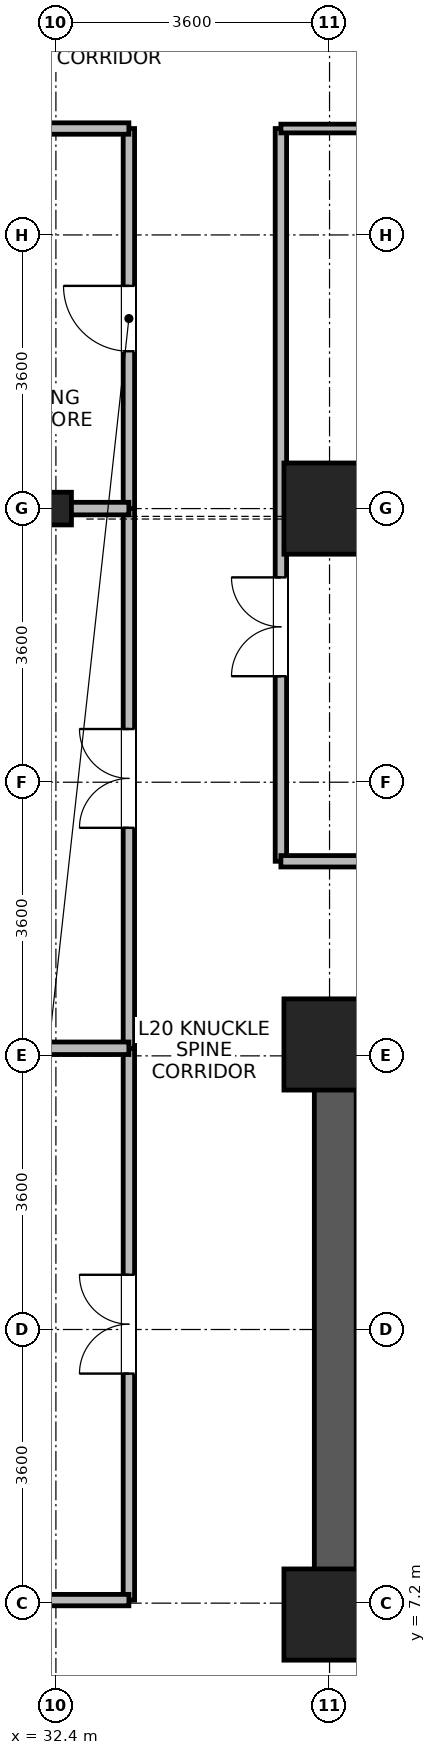
"""IFC4 building model, lengths in metres.
Left out: names, types, materials, properties, quantities, classifications, styles, units other than length and angle.
Written with IfcOpenShell. Run it as: python <this file> out.ifc"""

import sys

from ifc_helpers import new_model, si_unit, direction, frame, frame_2d, origin, origin_2d, place, context, subcontext, project, spatial, rectangle, i_section, extrude, source, transform, mapped, element, fill, save


model = new_model("IFC4")
c1 = context("Model", 3, precision=1e-05, world=origin(), true_north=direction((0.0, 1.0)))
c2 = subcontext(c1, "Body", "Model", "MODEL_VIEW")
j1 = project(units=[si_unit("LENGTHUNIT", "METRE"), si_unit("PLANEANGLEUNIT", "RADIAN")], contexts=[c1])
p1 = place(None, origin())
s1 = spatial("IfcSite", under=j1, at=p1, CompositionType="ELEMENT")
p2 = place(p1, origin())
s2 = spatial("IfcBuilding", under=s1, at=p2, CompositionType="ELEMENT")
p3 = place(p2, frame((0.0, 0.0, 82.3)))
s3 = spatial("IfcBuildingStorey", under=s2, at=p3, CompositionType="ELEMENT", Elevation=82.3)
p4 = place(p3, frame((36.075, 6.75, 0.0), z_axis=(0.0, 0.0, 1.0), x_axis=(0.0, 1.0, 0.0)))
e1 = element("IfcWall", 1, at=p4, inside=s3, PredefinedType="SHEAR", context=c2, shape_type="SweptSolid", body=[
    extrude(rectangle(XDim=8.1, YDim=0.55, at=frame_2d((4.05, 0.0))), origin(), (0.0, 0.0, 1.0), 3.45),
])
m1 = source(origin(), c2, "Body", "SweptSolid", [
    extrude(rectangle(XDim=1.2, YDim=1.2, at=origin_2d()), origin(), (0.0, 0.0, 1.0), 3.7),
])
for number, where, z_axis, x_axis in (
    (2, (36.0, 21.6, 0.0), (0.0, 0.0, 1.0), (1.0, 0.0, 0.0)),
    (3, (36.0, 7.05, 0.0), (0.0, 0.0, 1.0), (1.0, 0.0, 0.0)),
    (4, (36.0, 14.55, 0.0), (0.0, 0.0, 1.0), (1.0, 0.0, 0.0)),
):
    element("IfcColumn", number, at=place(p3, frame(where, z_axis=z_axis, x_axis=x_axis)), inside=s3, PredefinedType="COLUMN", context=c2, shape_type="MappedRepresentation", body=[
        mapped(m1, transform((0.0, 0.0, 0.0), x_axis=(1.0, 0.0, 0.0), y_axis=(0.0, 1.0, 0.0), z_axis=(0.0, 0.0, 1.0), scale=1.0)),
    ])
m2 = source(origin(), c2, "Body", "SweptSolid", [
    extrude(i_section(OverallWidth=0.409, OverallDepth=0.43, WebThickness=0.024, FlangeThickness=0.033, FilletRadius=0.015, at=origin_2d()), origin(), (0.0, 0.0, 1.0), 3.7),
])
p5 = place(p3, frame((32.4, 21.6, 0.0), z_axis=(0.0, 0.0, 1.0), x_axis=(1.0, 0.0, 0.0)))
e5 = element("IfcColumn", 5, at=p5, inside=s3, PredefinedType="COLUMN", context=c2, shape_type="MappedRepresentation", body=[
    mapped(m2, transform((0.0, 0.0, 0.0), x_axis=(1.0, 0.0, 0.0), y_axis=(0.0, 1.0, 0.0), z_axis=(0.0, 0.0, 1.0), scale=1.0)),
])
p6 = place(p3, frame((35.36, 16.96, 0.0), z_axis=(0.0, 0.0, 1.0), x_axis=(0.0, 1.0, 0.0)))
e6 = element("IfcWall", 6, at=p6, inside=s3, PredefinedType="PARTITIONING", context=c2, shape_type="SweptSolid", body=[
    extrude(rectangle(XDim=9.64, YDim=0.15, at=frame_2d((4.82, 0.0))), origin(), (0.0, 0.0, 1.0), 3.43),
])
p7 = place(p6, frame((2.435, 0.0, 0.0)))
e7 = element("IfcOpeningElement", 7, at=p7, cuts=e6, PredefinedType="OPENING", context=c2, shape_type="SweptSolid", body=[
    extrude(rectangle(XDim=1.3, YDim=2.12, at=frame_2d((0.65, 1.06))), frame((0.0, 0.085, 0.0), z_axis=(0.0, -1.0, 0.0), x_axis=(1.0, 0.0, 0.0)), (0.0, 0.0, 1.0), 0.17),
])
p8 = place(p3, frame((33.36, 7.24, 0.0), z_axis=(0.0, 0.0, 1.0), x_axis=(0.0, 1.0, 0.0)))
e8 = element("IfcWall", 8, at=p8, inside=s3, PredefinedType="PARTITIONING", context=c2, shape_type="SweptSolid", body=[
    extrude(rectangle(XDim=7.26, YDim=0.15, at=frame_2d((3.63, 0.0))), origin(), (0.0, 0.0, 1.0), 3.43),
])
p9 = place(p8, frame((2.98, 0.0, 0.0)))
e9 = element("IfcOpeningElement", 9, at=p9, cuts=e8, PredefinedType="OPENING", context=c2, shape_type="SweptSolid", body=[
    extrude(rectangle(XDim=1.3, YDim=2.12, at=frame_2d((0.65, 1.06))), frame((0.0, 0.085, 0.0), z_axis=(0.0, -1.0, 0.0), x_axis=(1.0, 0.0, 0.0)), (0.0, 0.0, 1.0), 0.17),
])
p10 = place(p3, frame((35.36, 16.96, 0.0), z_axis=(0.0, 0.0, 1.0), x_axis=(1.0, 0.0, 0.0)))
e10 = element("IfcWall", 10, at=p10, inside=s3, PredefinedType="PARTITIONING", context=c2, shape_type="SweptSolid", body=[
    extrude(rectangle(XDim=7.24, YDim=0.15, at=frame_2d((3.62, 0.0))), origin(), (0.0, 0.0, 1.0), 3.43),
])
p11 = place(p3, frame((33.36, 14.5, 0.0), z_axis=(0.0, 0.0, 1.0), x_axis=(0.0, 1.0, 0.0)))
e11 = element("IfcWall", 11, at=p11, inside=s3, PredefinedType="PARTITIONING", context=c2, shape_type="SweptSolid", body=[
    extrude(rectangle(XDim=7.1, YDim=0.15, at=frame_2d((3.55, 0.0))), origin(), (0.0, 0.0, 1.0), 3.43),
])
p12 = place(p11, frame((2.9, 0.0, 0.0)))
e12 = element("IfcOpeningElement", 12, at=p12, cuts=e11, PredefinedType="OPENING", context=c2, shape_type="SweptSolid", body=[
    extrude(rectangle(XDim=1.3, YDim=2.12, at=frame_2d((0.65, 1.06))), frame((0.0, 0.085, 0.0), z_axis=(0.0, -1.0, 0.0), x_axis=(1.0, 0.0, 0.0)), (0.0, 0.0, 1.0), 0.17),
])
p13 = place(p3, frame((33.36, 21.6, 0.0), z_axis=(0.0, 0.0, 1.0), x_axis=(0.0, 1.0, 0.0)))
e13 = element("IfcWall", 13, at=p13, inside=s3, PredefinedType="PARTITIONING", context=c2, shape_type="SweptSolid", body=[
    extrude(rectangle(XDim=5.0, YDim=0.15, at=frame_2d((2.5, 0.0))), origin(), (0.0, 0.0, 1.0), 3.43),
])
p14 = place(p13, frame((2.07, 0.0, 0.0)))
e14 = element("IfcOpeningElement", 14, at=p14, cuts=e13, PredefinedType="OPENING", context=c2, shape_type="SweptSolid", body=[
    extrude(rectangle(XDim=0.86, YDim=2.02, at=frame_2d((0.43, 1.01))), frame((0.0, 0.085, 0.0), z_axis=(0.0, -1.0, 0.0), x_axis=(1.0, 0.0, 0.0)), (0.0, 0.0, 1.0), 0.17),
])
p15 = place(p3, frame((30.46, 26.6, 0.0), z_axis=(0.0, 0.0, 1.0), x_axis=(1.0, 0.0, 0.0)))
e15 = element("IfcWall", 15, at=p15, inside=s3, PredefinedType="PARTITIONING", context=c2, shape_type="SweptSolid", body=[
    extrude(rectangle(XDim=2.9, YDim=0.15, at=frame_2d((1.45, 0.0))), origin(), (0.0, 0.0, 1.0), 3.43),
])
p16 = place(p3, frame((32.032, 7.24, 0.0), z_axis=(0.0, 0.0, 1.0), x_axis=(1.0, 0.0, 0.0)))
e16 = element("IfcWall", 16, at=p16, inside=s3, PredefinedType="PARTITIONING", context=c2, shape_type="SweptSolid", body=[
    extrude(rectangle(XDim=1.328, YDim=0.15, at=frame_2d((0.664, 0.0))), origin(), (0.0, 0.0, 1.0), 3.43),
])
p17 = place(p3, frame((35.36, 26.6, 0.0), z_axis=(0.0, 0.0, 1.0), x_axis=(1.0, 0.0, 0.0)))
e17 = element("IfcWall", 17, at=p17, inside=s3, PredefinedType="PARTITIONING", context=c2, shape_type="SweptSolid", body=[
    extrude(rectangle(XDim=7.24, YDim=0.115, at=frame_2d((3.62, 0.0))), origin(), (0.0, 0.0, 1.0), 3.43),
])
p18 = place(p3, frame((32.032, 14.5, 0.0), z_axis=(0.0, 0.0, 1.0), x_axis=(1.0, 0.0, 0.0)))
e18 = element("IfcWall", 18, at=p18, inside=s3, PredefinedType="PARTITIONING", context=c2, shape_type="SweptSolid", body=[
    extrude(rectangle(XDim=1.328, YDim=0.165, at=frame_2d((0.664, 0.0))), origin(), (0.0, 0.0, 1.0), 3.43),
])
p19 = place(p3, frame((32.032, 21.6, 0.0), z_axis=(0.0, 0.0, 1.0), x_axis=(1.0, 0.0, 0.0)))
e19 = element("IfcWall", 19, at=p19, inside=s3, PredefinedType="PARTITIONING", context=c2, shape_type="SweptSolid", body=[
    extrude(rectangle(XDim=1.328, YDim=0.165, at=frame_2d((0.664, 0.0))), origin(), (0.0, 0.0, 1.0), 2.93),
])
p20 = place(p7, origin())
e20 = element("IfcDoor", 20, at=p20, inside=s3, OperationType="DOUBLE_DOOR_SINGLE_SWING", PredefinedType="DOOR", context=c2, shape_type="SweptSolid", body=[
    extrude(rectangle(XDim=1.3, YDim=2.12, at=frame_2d((0.65, 1.06))), frame((0.0, 0.025, 0.0), z_axis=(0.0, -1.0, 0.0), x_axis=(1.0, 0.0, 0.0)), (0.0, 0.0, 1.0), 0.05),
])
fill(e7, e20)
p21 = place(p9, origin())
e21 = element("IfcDoor", 21, at=p21, inside=s3, OperationType="DOUBLE_DOOR_SINGLE_SWING", PredefinedType="DOOR", context=c2, shape_type="SweptSolid", body=[
    extrude(rectangle(XDim=1.3, YDim=2.12, at=frame_2d((0.65, 1.06))), frame((0.0, 0.025, 0.0), z_axis=(0.0, -1.0, 0.0), x_axis=(1.0, 0.0, 0.0)), (0.0, 0.0, 1.0), 0.05),
])
fill(e9, e21)
p22 = place(p12, origin())
e22 = element("IfcDoor", 22, at=p22, inside=s3, OperationType="DOUBLE_DOOR_SINGLE_SWING", PredefinedType="DOOR", context=c2, shape_type="SweptSolid", body=[
    extrude(rectangle(XDim=1.3, YDim=2.12, at=frame_2d((0.65, 1.06))), frame((0.0, 0.025, 0.0), z_axis=(0.0, -1.0, 0.0), x_axis=(1.0, 0.0, 0.0)), (0.0, 0.0, 1.0), 0.05),
])
fill(e12, e22)
p23 = place(p14, origin())
e23 = element("IfcDoor", 23, at=p23, inside=s3, OperationType="SINGLE_SWING_RIGHT", PredefinedType="DOOR", context=c2, shape_type="SweptSolid", body=[
    extrude(rectangle(XDim=0.86, YDim=2.02, at=frame_2d((0.43, 1.01))), frame((0.0, 0.025, 0.0), z_axis=(0.0, -1.0, 0.0), x_axis=(1.0, 0.0, 0.0)), (0.0, 0.0, 1.0), 0.05),
])
fill(e14, e23)
save(model, sys.argv[1])
